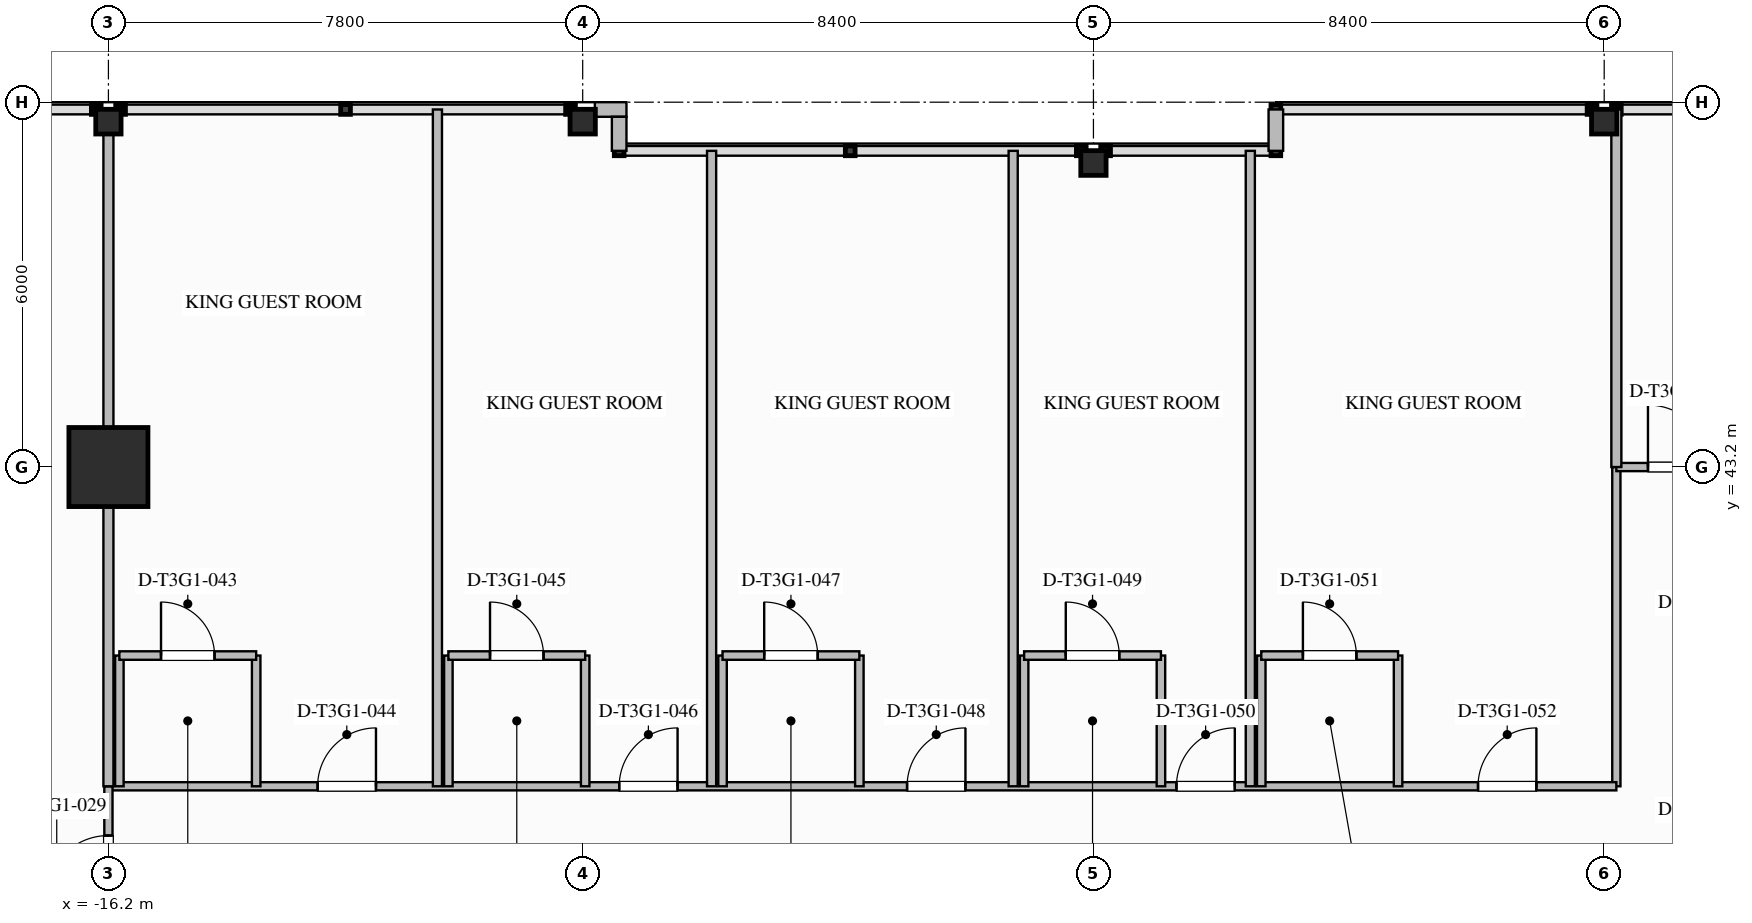
"""IFC4 building model, lengths in metres.
Left out: names, types, materials, properties, quantities, classifications, styles, units other than length and angle.
Written with IfcOpenShell. Run it as: python <this file> out.ifc"""

import sys

from ifc_helpers import new_model, si_unit, direction, frame, frame_2d, origin, origin_2d, place, context, subcontext, project, spatial, rectangle, i_section, extrude, element, fill, save


model = new_model("IFC4")
c1 = context("Model", 3, precision=1e-05, world=origin(), true_north=direction((0.0, 1.0)))
c2 = subcontext(c1, "Body", "Model", "MODEL_VIEW")
j1 = project(units=[si_unit("LENGTHUNIT", "METRE"), si_unit("PLANEANGLEUNIT", "RADIAN")], contexts=[c1])
p1 = place(None, origin())
s1 = spatial("IfcSite", under=j1, at=p1, CompositionType="ELEMENT")
p2 = place(p1, origin())
s2 = spatial("IfcBuilding", under=s1, at=p2, CompositionType="ELEMENT")
p3 = place(p2, frame((0.0, 0.0, 150.4)))
s3 = spatial("IfcBuildingStorey", under=s2, at=p3, CompositionType="ELEMENT", Elevation=150.4)
p4 = place(p3, frame((-16.2, 43.2, 0.0), z_axis=(0.0, 0.0, 1.0), x_axis=(1.0, 0.0, 0.0)))
e1 = element("IfcColumn", 1, at=p4, inside=s3, PredefinedType="COLUMN", context=c2, shape_type="SweptSolid", body=[
    extrude(rectangle(XDim=1.3, YDim=1.3, at=origin_2d()), origin(), (0.0, 0.0, 1.0), 3.55),
])
for number, where, z_axis, x_axis in (
    (2, (-16.2, 48.88, 0.0), (0.0, 0.0, 1.0), (0.0, 1.0, 0.0)),
    (3, (-8.4, 48.88, 0.0), (0.0, 0.0, 1.0), (0.0, 1.0, 0.0)),
    (4, (0.0, 48.2, 0.0), (0.0, 0.0, 1.0), (0.0, 1.0, 0.0)),
    (5, (8.4, 48.88, 0.0), (0.0, 0.0, 1.0), (0.0, 1.0, 0.0)),
):
    element("IfcColumn", number, at=place(p3, frame(where, z_axis=z_axis, x_axis=x_axis)), inside=s3, PredefinedType="COLUMN", context=c2, shape_type="SweptSolid", body=[
        extrude(i_section(OverallWidth=0.406, OverallDepth=0.416, WebThickness=0.03, FlangeThickness=0.048, FilletRadius=0.028, at=origin_2d()), origin(), (0.0, 0.0, 1.0), 3.547),
    ])
p5 = place(p3, frame((-8.2, 49.08, 0.0), z_axis=(0.0, 0.0, 1.0), x_axis=(1.0, 0.0, 0.0)))
e6 = element("IfcWall", 6, at=p5, inside=s3, PredefinedType="STANDARD", context=c2, shape_type="SweptSolid", body=[
    extrude(rectangle(XDim=0.52, YDim=0.24, at=frame_2d((0.26, 0.0))), origin(), (0.0, 0.0, 1.0), 3.29),
])
p6 = place(p3, frame((-7.8, 48.96, 0.0), z_axis=(0.0, 0.0, 1.0), x_axis=(0.0, -1.0, 0.0)))
e7 = element("IfcWall", 7, at=p6, inside=s3, PredefinedType="STANDARD", context=c2, shape_type="SweptSolid", body=[
    extrude(rectangle(XDim=0.56, YDim=0.24, at=frame_2d((0.28, 0.0))), origin(), (0.0, 0.0, 1.0), 3.29),
])
p7 = place(p3, frame((3.0, 48.4, 0.0), z_axis=(0.0, 0.0, 1.0), x_axis=(0.0, 1.0, 0.0)))
e8 = element("IfcWall", 8, at=p7, inside=s3, PredefinedType="STANDARD", context=c2, shape_type="SweptSolid", body=[
    extrude(rectangle(XDim=0.68, YDim=0.24, at=frame_2d((0.34, 0.0))), origin(), (0.0, 0.0, 1.0), 3.29),
])
p8 = place(p3, frame((8.6, 37.95, 0.0), z_axis=(0.0, 0.0, 1.0), x_axis=(0.0, 1.0, 0.0)))
e9 = element("IfcWall", 9, at=p8, inside=s3, PredefinedType="PARTITIONING", context=c2, shape_type="SweptSolid", body=[
    extrude(rectangle(XDim=5.25, YDim=0.135, at=frame_2d((2.625, 0.0))), origin(), (0.0, 0.0, 1.0), 2.667),
])
p9 = place(p3, frame((-16.2, 37.95, 0.0), z_axis=(0.0, 0.0, 1.0), x_axis=(1.0, 0.0, 0.0)))
e10 = element("IfcWall", 10, at=p9, inside=s3, PredefinedType="PARTITIONING", context=c2, shape_type="SweptSolid", body=[
    extrude(rectangle(XDim=24.8, YDim=0.135, at=frame_2d((12.4, 0.0))), origin(), (0.0, 0.0, 1.0), 3.29),
])
p10 = place(p9, frame((3.44, 0.0, 0.0)))
e11 = element("IfcOpeningElement", 11, at=p10, cuts=e10, PredefinedType="OPENING", context=c2, shape_type="SweptSolid", body=[
    extrude(rectangle(XDim=0.96, YDim=2.15, at=frame_2d((0.48, 1.075))), frame((0.0, 0.077, 0.0), z_axis=(0.0, -1.0, 0.0), x_axis=(1.0, 0.0, 0.0)), (0.0, 0.0, 1.0), 0.155),
])
p11 = place(p9, frame((8.4, 0.0, 0.0)))
e12 = element("IfcOpeningElement", 12, at=p11, cuts=e10, PredefinedType="OPENING", context=c2, shape_type="SweptSolid", body=[
    extrude(rectangle(XDim=0.96, YDim=2.15, at=frame_2d((0.48, 1.075))), frame((0.0, 0.077, 0.0), z_axis=(0.0, -1.0, 0.0), x_axis=(1.0, 0.0, 0.0)), (0.0, 0.0, 1.0), 0.155),
])
p12 = place(p9, frame((13.135, 0.0, 0.0)))
e13 = element("IfcOpeningElement", 13, at=p12, cuts=e10, PredefinedType="OPENING", context=c2, shape_type="SweptSolid", body=[
    extrude(rectangle(XDim=0.96, YDim=2.15, at=frame_2d((0.48, 1.075))), frame((0.0, 0.077, 0.0), z_axis=(0.0, -1.0, 0.0), x_axis=(1.0, 0.0, 0.0)), (0.0, 0.0, 1.0), 0.155),
])
p13 = place(p9, frame((17.565, 0.0, 0.0)))
e14 = element("IfcOpeningElement", 14, at=p13, cuts=e10, PredefinedType="OPENING", context=c2, shape_type="SweptSolid", body=[
    extrude(rectangle(XDim=0.96, YDim=2.15, at=frame_2d((0.48, 1.075))), frame((0.0, 0.077, 0.0), z_axis=(0.0, -1.0, 0.0), x_axis=(1.0, 0.0, 0.0)), (0.0, 0.0, 1.0), 0.155),
])
p14 = place(p9, frame((22.525, 0.0, 0.0)))
e15 = element("IfcOpeningElement", 15, at=p14, cuts=e10, PredefinedType="OPENING", context=c2, shape_type="SweptSolid", body=[
    extrude(rectangle(XDim=0.96, YDim=2.15, at=frame_2d((0.48, 1.075))), frame((0.0, 0.077, 0.0), z_axis=(0.0, -1.0, 0.0), x_axis=(1.0, 0.0, 0.0)), (0.0, 0.0, 1.0), 0.155),
])
p15 = place(p3, frame((-16.2, 35.6, 0.0), z_axis=(0.0, 0.0, 1.0), x_axis=(0.0, 1.0, 0.0)))
e16 = element("IfcWall", 16, at=p15, inside=s3, PredefinedType="PARTITIONING", context=c2, shape_type="SweptSolid", body=[
    extrude(rectangle(XDim=2.35, YDim=0.135, at=frame_2d((1.175, 0.0))), origin(), (0.0, 0.0, 1.0), 2.58),
])
p16 = place(p15, frame((0.52, 0.0, 0.0)))
e17 = element("IfcOpeningElement", 17, at=p16, cuts=e16, PredefinedType="OPENING", context=c2, shape_type="SweptSolid", body=[
    extrude(rectangle(XDim=1.02, YDim=2.15, at=frame_2d((0.51, 1.075))), frame((0.0, 0.077, 0.0), z_axis=(0.0, -1.0, 0.0), x_axis=(1.0, 0.0, 0.0)), (0.0, 0.0, 1.0), 0.155),
])
p17 = place(p3, frame((8.6, 43.2, 0.0), z_axis=(0.0, 0.0, 1.0), x_axis=(1.0, 0.0, 0.0)))
e18 = element("IfcWall", 18, at=p17, inside=s3, PredefinedType="PARTITIONING", context=c2, shape_type="SweptSolid", body=[
    extrude(rectangle(XDim=2.35, YDim=0.135, at=frame_2d((1.175, 0.0))), origin(), (0.0, 0.0, 1.0), 2.58),
])
p18 = place(p17, frame((0.52, 0.0, 0.0)))
e19 = element("IfcOpeningElement", 19, at=p18, cuts=e18, PredefinedType="OPENING", context=c2, shape_type="SweptSolid", body=[
    extrude(rectangle(XDim=1.02, YDim=2.15, at=frame_2d((0.51, 1.075))), frame((0.0, 0.077, 0.0), z_axis=(0.0, -1.0, 0.0), x_axis=(1.0, 0.0, 0.0)), (0.0, 0.0, 1.0), 0.155),
])
p19 = place(p3, frame((-16.2, 37.95, 0.0), z_axis=(0.0, 0.0, 1.0), x_axis=(0.0, 1.0, 0.0)))
e20 = element("IfcWall", 20, at=p19, inside=s3, PredefinedType="PARTITIONING", context=c2, shape_type="SweptSolid", body=[
    extrude(rectangle(XDim=11.13, YDim=0.165, at=frame_2d((5.565, 0.0))), origin(), (0.0, 0.0, 1.0), 2.58),
])
p20 = place(p3, frame((8.6, 43.2, 0.0), z_axis=(0.0, 0.0, 1.0), x_axis=(0.0, 1.0, 0.0)))
e21 = element("IfcWall", 21, at=p20, inside=s3, PredefinedType="PARTITIONING", context=c2, shape_type="SweptSolid", body=[
    extrude(rectangle(XDim=5.88, YDim=0.165, at=frame_2d((2.94, 0.0))), origin(), (0.0, 0.0, 1.0), 2.58),
])
p21 = place(p3, frame((-16.02, 37.95, 0.0), z_axis=(0.0, 0.0, 1.0), x_axis=(0.0, 1.0, 0.0)))
e22 = element("IfcWall", 22, at=p21, inside=s3, PredefinedType="PLUMBINGWALL", context=c2, shape_type="SweptSolid", body=[
    extrude(rectangle(XDim=2.15, YDim=0.14, at=frame_2d((1.075, 0.0))), origin(), (0.0, 0.0, 1.0), 2.58),
])
p22 = place(p3, frame((-13.77, 37.95, 0.0), z_axis=(0.0, 0.0, 1.0), x_axis=(0.0, 1.0, 0.0)))
e23 = element("IfcWall", 23, at=p22, inside=s3, PredefinedType="PLUMBINGWALL", context=c2, shape_type="SweptSolid", body=[
    extrude(rectangle(XDim=2.15, YDim=0.14, at=frame_2d((1.075, 0.0))), origin(), (0.0, 0.0, 1.0), 3.29),
])
p23 = place(p3, frame((-16.02, 40.1, 0.0), z_axis=(0.0, 0.0, 1.0), x_axis=(1.0, 0.0, 0.0)))
e24 = element("IfcWall", 24, at=p23, inside=s3, PredefinedType="PLUMBINGWALL", context=c2, shape_type="SweptSolid", body=[
    extrude(rectangle(XDim=2.25, YDim=0.14, at=frame_2d((1.125, 0.0))), origin(), (0.0, 0.0, 1.0), 3.29),
])
p24 = place(p23, frame((0.685, 0.0, 0.0)))
e25 = element("IfcOpeningElement", 25, at=p24, cuts=e24, PredefinedType="OPENING", context=c2, shape_type="SweptSolid", body=[
    extrude(rectangle(XDim=0.88, YDim=2.1, at=frame_2d((0.44, 1.05))), frame((0.0, 0.08, 0.0), z_axis=(0.0, -1.0, 0.0), x_axis=(1.0, 0.0, 0.0)), (0.0, 0.0, 1.0), 0.16),
])
p25 = place(p3, frame((-10.789, 37.95, 0.0), z_axis=(0.0, 0.0, 1.0), x_axis=(0.0, 1.0, 0.0)))
e26 = element("IfcWall", 26, at=p25, inside=s3, PredefinedType="PARTITIONING", context=c2, shape_type="SweptSolid", body=[
    extrude(rectangle(XDim=11.13, YDim=0.15, at=frame_2d((5.565, 0.0))), origin(), (0.0, 0.0, 1.0), 3.29),
])
p26 = place(p3, frame((-10.609, 37.95, 0.0), z_axis=(0.0, 0.0, 1.0), x_axis=(0.0, 1.0, 0.0)))
e27 = element("IfcWall", 27, at=p26, inside=s3, PredefinedType="PLUMBINGWALL", context=c2, shape_type="SweptSolid", body=[
    extrude(rectangle(XDim=2.15, YDim=0.14, at=frame_2d((1.075, 0.0))), origin(), (0.0, 0.0, 1.0), 3.29),
])
p27 = place(p3, frame((-8.359, 37.95, 0.0), z_axis=(0.0, 0.0, 1.0), x_axis=(0.0, 1.0, 0.0)))
e28 = element("IfcWall", 28, at=p27, inside=s3, PredefinedType="PLUMBINGWALL", context=c2, shape_type="SweptSolid", body=[
    extrude(rectangle(XDim=2.15, YDim=0.14, at=frame_2d((1.075, 0.0))), origin(), (0.0, 0.0, 1.0), 2.667),
])
p28 = place(p3, frame((-10.609, 40.1, 0.0), z_axis=(0.0, 0.0, 1.0), x_axis=(1.0, 0.0, 0.0)))
e29 = element("IfcWall", 29, at=p28, inside=s3, PredefinedType="PLUMBINGWALL", context=c2, shape_type="SweptSolid", body=[
    extrude(rectangle(XDim=2.25, YDim=0.14, at=frame_2d((1.125, 0.0))), origin(), (0.0, 0.0, 1.0), 3.29),
])
p29 = place(p28, frame((0.685, 0.0, 0.0)))
e30 = element("IfcOpeningElement", 30, at=p29, cuts=e29, PredefinedType="OPENING", context=c2, shape_type="SweptSolid", body=[
    extrude(rectangle(XDim=0.88, YDim=2.1, at=frame_2d((0.44, 1.05))), frame((0.0, 0.08, 0.0), z_axis=(0.0, -1.0, 0.0), x_axis=(1.0, 0.0, 0.0)), (0.0, 0.0, 1.0), 0.16),
])
p30 = place(p3, frame((-6.28, 37.95, 0.0), z_axis=(0.0, 0.0, 1.0), x_axis=(0.0, 1.0, 0.0)))
e31 = element("IfcWall", 31, at=p30, inside=s3, PredefinedType="PARTITIONING", context=c2, shape_type="SweptSolid", body=[
    extrude(rectangle(XDim=10.45, YDim=0.15, at=frame_2d((5.225, 0.0))), origin(), (0.0, 0.0, 1.0), 3.29),
])
for number, where, z_axis, x_axis in (
    (32, (-6.1, 37.95, 0.0), (0.0, 0.0, 1.0), (0.0, 1.0, 0.0)),
    (33, (-3.85, 37.95, 0.0), (0.0, 0.0, 1.0), (0.0, 1.0, 0.0)),
):
    element("IfcWall", number, at=place(p3, frame(where, z_axis=z_axis, x_axis=x_axis)), inside=s3, PredefinedType="PLUMBINGWALL", context=c2, shape_type="SweptSolid", body=[
        extrude(rectangle(XDim=2.15, YDim=0.14, at=frame_2d((1.075, 0.0))), origin(), (0.0, 0.0, 1.0), 3.29),
    ])
p31 = place(p3, frame((-6.1, 40.1, 0.0), z_axis=(0.0, 0.0, 1.0), x_axis=(1.0, 0.0, 0.0)))
e34 = element("IfcWall", 34, at=p31, inside=s3, PredefinedType="PLUMBINGWALL", context=c2, shape_type="SweptSolid", body=[
    extrude(rectangle(XDim=2.25, YDim=0.14, at=frame_2d((1.125, 0.0))), origin(), (0.0, 0.0, 1.0), 3.29),
])
p32 = place(p31, frame((0.685, 0.0, 0.0)))
e35 = element("IfcOpeningElement", 35, at=p32, cuts=e34, PredefinedType="OPENING", context=c2, shape_type="SweptSolid", body=[
    extrude(rectangle(XDim=0.88, YDim=2.1, at=frame_2d((0.44, 1.05))), frame((0.0, 0.08, 0.0), z_axis=(0.0, -1.0, 0.0), x_axis=(1.0, 0.0, 0.0)), (0.0, 0.0, 1.0), 0.16),
])
p33 = place(p3, frame((-1.32, 37.95, 0.0), z_axis=(0.0, 0.0, 1.0), x_axis=(0.0, 1.0, 0.0)))
e36 = element("IfcWall", 36, at=p33, inside=s3, PredefinedType="PARTITIONING", context=c2, shape_type="SweptSolid", body=[
    extrude(rectangle(XDim=10.45, YDim=0.15, at=frame_2d((5.225, 0.0))), origin(), (0.0, 0.0, 1.0), 3.29),
])
for number, where, z_axis, x_axis in (
    (37, (-1.14, 37.95, 0.0), (0.0, 0.0, 1.0), (0.0, 1.0, 0.0)),
    (38, (1.11, 37.95, 0.0), (0.0, 0.0, 1.0), (0.0, 1.0, 0.0)),
):
    element("IfcWall", number, at=place(p3, frame(where, z_axis=z_axis, x_axis=x_axis)), inside=s3, PredefinedType="PLUMBINGWALL", context=c2, shape_type="SweptSolid", body=[
        extrude(rectangle(XDim=2.15, YDim=0.14, at=frame_2d((1.075, 0.0))), origin(), (0.0, 0.0, 1.0), 3.29),
    ])
p34 = place(p3, frame((-1.14, 40.1, 0.0), z_axis=(0.0, 0.0, 1.0), x_axis=(1.0, 0.0, 0.0)))
e39 = element("IfcWall", 39, at=p34, inside=s3, PredefinedType="PLUMBINGWALL", context=c2, shape_type="SweptSolid", body=[
    extrude(rectangle(XDim=2.25, YDim=0.14, at=frame_2d((1.125, 0.0))), origin(), (0.0, 0.0, 1.0), 3.29),
])
p35 = place(p34, frame((0.685, 0.0, 0.0)))
e40 = element("IfcOpeningElement", 40, at=p35, cuts=e39, PredefinedType="OPENING", context=c2, shape_type="SweptSolid", body=[
    extrude(rectangle(XDim=0.88, YDim=2.1, at=frame_2d((0.44, 1.05))), frame((0.0, 0.08, 0.0), z_axis=(0.0, -1.0, 0.0), x_axis=(1.0, 0.0, 0.0)), (0.0, 0.0, 1.0), 0.16),
])
p36 = place(p3, frame((2.58, 37.95, 0.0), z_axis=(0.0, 0.0, 1.0), x_axis=(0.0, 1.0, 0.0)))
e41 = element("IfcWall", 41, at=p36, inside=s3, PredefinedType="PARTITIONING", context=c2, shape_type="SweptSolid", body=[
    extrude(rectangle(XDim=10.45, YDim=0.15, at=frame_2d((5.225, 0.0))), origin(), (0.0, 0.0, 1.0), 3.29),
])
for number, where, z_axis, x_axis in (
    (42, (2.76, 37.95, 0.0), (0.0, 0.0, 1.0), (0.0, 1.0, 0.0)),
    (43, (5.01, 37.95, 0.0), (0.0, 0.0, 1.0), (0.0, 1.0, 0.0)),
):
    element("IfcWall", number, at=place(p3, frame(where, z_axis=z_axis, x_axis=x_axis)), inside=s3, PredefinedType="PLUMBINGWALL", context=c2, shape_type="SweptSolid", body=[
        extrude(rectangle(XDim=2.15, YDim=0.14, at=frame_2d((1.075, 0.0))), origin(), (0.0, 0.0, 1.0), 3.29),
    ])
p37 = place(p3, frame((2.76, 40.1, 0.0), z_axis=(0.0, 0.0, 1.0), x_axis=(1.0, 0.0, 0.0)))
e44 = element("IfcWall", 44, at=p37, inside=s3, PredefinedType="PLUMBINGWALL", context=c2, shape_type="SweptSolid", body=[
    extrude(rectangle(XDim=2.25, YDim=0.14, at=frame_2d((1.125, 0.0))), origin(), (0.0, 0.0, 1.0), 3.29),
])
p38 = place(p37, frame((0.685, 0.0, 0.0)))
e45 = element("IfcOpeningElement", 45, at=p38, cuts=e44, PredefinedType="OPENING", context=c2, shape_type="SweptSolid", body=[
    extrude(rectangle(XDim=0.88, YDim=2.1, at=frame_2d((0.44, 1.05))), frame((0.0, 0.08, 0.0), z_axis=(0.0, -1.0, 0.0), x_axis=(1.0, 0.0, 0.0)), (0.0, 0.0, 1.0), 0.16),
])
p39 = place(p16, origin())
e46 = element("IfcDoor", 46, at=p39, inside=s3, OperationType="SINGLE_SWING_LEFT", PredefinedType="DOOR", context=c2, shape_type="SweptSolid", body=[
    extrude(rectangle(XDim=1.02, YDim=2.15, at=frame_2d((0.51, 1.075))), frame((0.0, 0.025, 0.0), z_axis=(0.0, -1.0, 0.0), x_axis=(1.0, 0.0, 0.0)), (0.0, 0.0, 1.0), 0.05),
])
fill(e17, e46)
p40 = place(p18, origin())
e47 = element("IfcDoor", 47, at=p40, inside=s3, OperationType="SINGLE_SWING_LEFT", PredefinedType="DOOR", context=c2, shape_type="SweptSolid", body=[
    extrude(rectangle(XDim=1.02, YDim=2.15, at=frame_2d((0.51, 1.075))), frame((0.0, 0.025, 0.0), z_axis=(0.0, -1.0, 0.0), x_axis=(1.0, 0.0, 0.0)), (0.0, 0.0, 1.0), 0.05),
])
fill(e19, e47)
p41 = place(p24, origin())
e48 = element("IfcDoor", 48, at=p41, inside=s3, OperationType="SINGLE_SWING_LEFT", PredefinedType="DOOR", context=c2, shape_type="SweptSolid", body=[
    extrude(rectangle(XDim=0.88, YDim=2.1, at=frame_2d((0.44, 1.05))), frame((0.0, 0.025, 0.0), z_axis=(0.0, -1.0, 0.0), x_axis=(1.0, 0.0, 0.0)), (0.0, 0.0, 1.0), 0.05),
])
fill(e25, e48)
p42 = place(p10, origin())
e49 = element("IfcDoor", 49, at=p42, inside=s3, OperationType="SINGLE_SWING_RIGHT", PredefinedType="DOOR", context=c2, shape_type="SweptSolid", body=[
    extrude(rectangle(XDim=0.96, YDim=2.15, at=frame_2d((0.48, 1.075))), frame((0.0, 0.025, 0.0), z_axis=(0.0, -1.0, 0.0), x_axis=(1.0, 0.0, 0.0)), (0.0, 0.0, 1.0), 0.05),
])
fill(e11, e49)
p43 = place(p29, origin())
e50 = element("IfcDoor", 50, at=p43, inside=s3, OperationType="SINGLE_SWING_LEFT", PredefinedType="DOOR", context=c2, shape_type="SweptSolid", body=[
    extrude(rectangle(XDim=0.88, YDim=2.1, at=frame_2d((0.44, 1.05))), frame((0.0, 0.025, 0.0), z_axis=(0.0, -1.0, 0.0), x_axis=(1.0, 0.0, 0.0)), (0.0, 0.0, 1.0), 0.05),
])
fill(e30, e50)
p44 = place(p11, origin())
e51 = element("IfcDoor", 51, at=p44, inside=s3, OperationType="SINGLE_SWING_RIGHT", PredefinedType="DOOR", context=c2, shape_type="SweptSolid", body=[
    extrude(rectangle(XDim=0.96, YDim=2.15, at=frame_2d((0.48, 1.075))), frame((0.0, 0.025, 0.0), z_axis=(0.0, -1.0, 0.0), x_axis=(1.0, 0.0, 0.0)), (0.0, 0.0, 1.0), 0.05),
])
fill(e12, e51)
p45 = place(p32, origin())
e52 = element("IfcDoor", 52, at=p45, inside=s3, OperationType="SINGLE_SWING_LEFT", PredefinedType="DOOR", context=c2, shape_type="SweptSolid", body=[
    extrude(rectangle(XDim=0.88, YDim=2.1, at=frame_2d((0.44, 1.05))), frame((0.0, 0.025, 0.0), z_axis=(0.0, -1.0, 0.0), x_axis=(1.0, 0.0, 0.0)), (0.0, 0.0, 1.0), 0.05),
])
fill(e35, e52)
p46 = place(p12, origin())
e53 = element("IfcDoor", 53, at=p46, inside=s3, OperationType="SINGLE_SWING_RIGHT", PredefinedType="DOOR", context=c2, shape_type="SweptSolid", body=[
    extrude(rectangle(XDim=0.96, YDim=2.15, at=frame_2d((0.48, 1.075))), frame((0.0, 0.025, 0.0), z_axis=(0.0, -1.0, 0.0), x_axis=(1.0, 0.0, 0.0)), (0.0, 0.0, 1.0), 0.05),
])
fill(e13, e53)
p47 = place(p35, origin())
e54 = element("IfcDoor", 54, at=p47, inside=s3, OperationType="SINGLE_SWING_LEFT", PredefinedType="DOOR", context=c2, shape_type="SweptSolid", body=[
    extrude(rectangle(XDim=0.88, YDim=2.1, at=frame_2d((0.44, 1.05))), frame((0.0, 0.025, 0.0), z_axis=(0.0, -1.0, 0.0), x_axis=(1.0, 0.0, 0.0)), (0.0, 0.0, 1.0), 0.05),
])
fill(e40, e54)
p48 = place(p13, origin())
e55 = element("IfcDoor", 55, at=p48, inside=s3, OperationType="SINGLE_SWING_RIGHT", PredefinedType="DOOR", context=c2, shape_type="SweptSolid", body=[
    extrude(rectangle(XDim=0.96, YDim=2.15, at=frame_2d((0.48, 1.075))), frame((0.0, 0.025, 0.0), z_axis=(0.0, -1.0, 0.0), x_axis=(1.0, 0.0, 0.0)), (0.0, 0.0, 1.0), 0.05),
])
fill(e14, e55)
p49 = place(p38, origin())
e56 = element("IfcDoor", 56, at=p49, inside=s3, OperationType="SINGLE_SWING_LEFT", PredefinedType="DOOR", context=c2, shape_type="SweptSolid", body=[
    extrude(rectangle(XDim=0.88, YDim=2.1, at=frame_2d((0.44, 1.05))), frame((0.0, 0.025, 0.0), z_axis=(0.0, -1.0, 0.0), x_axis=(1.0, 0.0, 0.0)), (0.0, 0.0, 1.0), 0.05),
])
fill(e45, e56)
p50 = place(p14, origin())
e57 = element("IfcDoor", 57, at=p50, inside=s3, OperationType="SINGLE_SWING_RIGHT", PredefinedType="DOOR", context=c2, shape_type="SweptSolid", body=[
    extrude(rectangle(XDim=0.96, YDim=2.15, at=frame_2d((0.48, 1.075))), frame((0.0, 0.025, 0.0), z_axis=(0.0, -1.0, 0.0), x_axis=(1.0, 0.0, 0.0)), (0.0, 0.0, 1.0), 0.05),
])
fill(e15, e57)
save(model, sys.argv[1])
